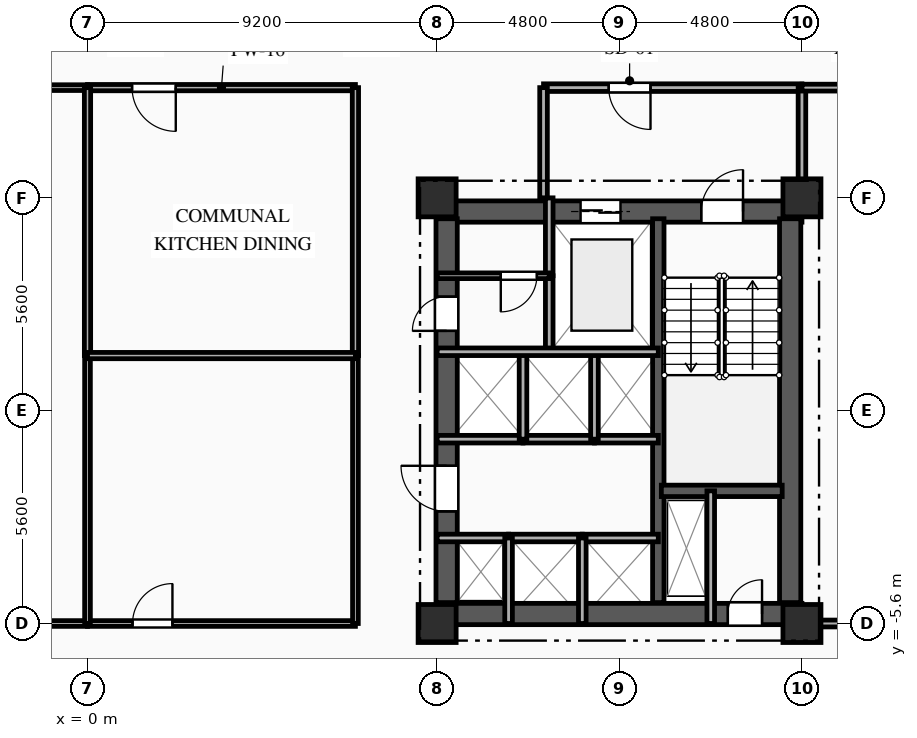
"""IFC4 building model, lengths in metres.
Left out: names, types, materials, properties, quantities, classifications, styles, units other than length and angle.
Written with IfcOpenShell. Run it as: python <this file> out.ifc"""

import sys

from ifc_helpers import new_model, si_unit, direction, frame, frame_2d, origin, origin_2d, place, context, subcontext, project, spatial, rectangle, extrude, element, fill, save


model = new_model("IFC4")
c1 = context("Model", 3, precision=1e-05, world=origin(), true_north=direction((0.0, 1.0)))
c2 = subcontext(c1, "Body", "Model", "MODEL_VIEW")
j1 = project(units=[si_unit("LENGTHUNIT", "METRE"), si_unit("PLANEANGLEUNIT", "RADIAN")], contexts=[c1])
p1 = place(None, origin())
s1 = spatial("IfcSite", under=j1, at=p1, CompositionType="ELEMENT")
p2 = place(p1, origin())
s2 = spatial("IfcBuilding", under=s1, at=p2, CompositionType="ELEMENT")
p3 = place(p2, frame((0.0, 0.0, 89.05)))
s3 = spatial("IfcBuildingStorey", under=s2, at=p3, CompositionType="ELEMENT", Elevation=89.05)
for number, where, z_axis, x_axis in (
    (1, (9.2, -5.6, 0.0), (0.0, 0.0, 1.0), (1.0, 0.0, 0.0)),
    (2, (9.2, 5.6, 0.0), (0.0, 0.0, 1.0), (1.0, 0.0, 0.0)),
    (3, (18.8, -5.6, 0.0), (0.0, 0.0, 1.0), (1.0, 0.0, 0.0)),
    (4, (18.8, 5.6, 0.0), (0.0, 0.0, 1.0), (1.0, 0.0, 0.0)),
):
    element("IfcColumn", number, at=place(p3, frame(where, z_axis=z_axis, x_axis=x_axis)), inside=s3, PredefinedType="COLUMN", context=c2, shape_type="SweptSolid", body=[
        extrude(rectangle(XDim=1.0, YDim=1.0, at=origin_2d()), origin(), (0.0, 0.0, 1.0), 3.35),
    ])
p4 = place(p3, frame((9.2, 5.24, 0.0), z_axis=(0.0, 0.0, 1.0), x_axis=(1.0, 0.0, 0.0)))
e5 = element("IfcWall", 5, at=p4, inside=s3, PredefinedType="SHEAR", context=c2, shape_type="SweptSolid", body=[
    extrude(rectangle(XDim=9.6, YDim=0.56, at=frame_2d((4.8, 0.0))), origin(), (0.0, 0.0, 1.0), 3.045),
])
p5 = place(p4, frame((6.95, 0.0, 0.0)))
e6 = element("IfcOpeningElement", 6, at=p5, cuts=e5, PredefinedType="OPENING", context=c2, shape_type="SweptSolid", body=[
    extrude(rectangle(XDim=1.1, YDim=2.15, at=frame_2d((0.55, 1.075))), frame((0.0, 0.29, 0.0), z_axis=(0.0, -1.0, 0.0), x_axis=(1.0, 0.0, 0.0)), (0.0, 0.0, 1.0), 0.58),
])
p6 = place(p4, frame((3.775, 0.0, 0.0)))
e7 = element("IfcOpeningElement", 7, at=p6, cuts=e5, PredefinedType="OPENING", context=c2, shape_type="SweptSolid", body=[
    extrude(rectangle(XDim=1.05, YDim=2.1, at=frame_2d((0.525, 1.05))), frame((0.0, 0.29, 0.0), z_axis=(0.0, -1.0, 0.0), x_axis=(1.0, 0.0, 0.0)), (0.0, 0.0, 1.0), 0.58),
])
p7 = place(p3, frame((9.2, -5.35, 0.0), z_axis=(0.0, 0.0, 1.0), x_axis=(1.0, 0.0, 0.0)))
e8 = element("IfcWall", 8, at=p7, inside=s3, PredefinedType="SHEAR", context=c2, shape_type="SweptSolid", body=[
    extrude(rectangle(XDim=9.6, YDim=0.56, at=frame_2d((4.8, 0.0))), origin(), (0.0, 0.0, 1.0), 3.045),
])
p8 = place(p7, frame((7.65, 0.0, 0.0)))
e9 = element("IfcOpeningElement", 9, at=p8, cuts=e8, PredefinedType="OPENING", context=c2, shape_type="SweptSolid", body=[
    extrude(rectangle(XDim=0.9, YDim=2.1, at=frame_2d((0.45, 1.05))), frame((0.0, 0.29, 0.0), z_axis=(0.0, -1.0, 0.0), x_axis=(1.0, 0.0, 0.0)), (0.0, 0.0, 1.0), 0.58),
])
p9 = place(p3, frame((9.45, -5.05, 0.0), z_axis=(0.0, 0.0, 1.0), x_axis=(0.0, 1.0, 0.0)))
e10 = element("IfcWall", 10, at=p9, inside=s3, PredefinedType="SHEAR", context=c2, shape_type="SweptSolid", body=[
    extrude(rectangle(XDim=10.1, YDim=0.56, at=frame_2d((5.05, 0.0))), origin(), (0.0, 0.0, 1.0), 3.045),
])
p10 = place(p9, frame((7.15, 0.0, 0.0)))
e11 = element("IfcOpeningElement", 11, at=p10, cuts=e10, PredefinedType="OPENING", context=c2, shape_type="SweptSolid", body=[
    extrude(rectangle(XDim=0.9, YDim=2.1, at=frame_2d((0.45, 1.05))), frame((0.0, 0.29, 0.0), z_axis=(0.0, -1.0, 0.0), x_axis=(1.0, 0.0, 0.0)), (0.0, 0.0, 1.0), 0.58),
])
p11 = place(p9, frame((2.4, 0.0, 0.0)))
e12 = element("IfcOpeningElement", 12, at=p11, cuts=e10, PredefinedType="OPENING", context=c2, shape_type="SweptSolid", body=[
    extrude(rectangle(XDim=1.2, YDim=2.15, at=frame_2d((0.6, 1.075))), frame((0.0, 0.29, 0.0), z_axis=(0.0, -1.0, 0.0), x_axis=(1.0, 0.0, 0.0)), (0.0, 0.0, 1.0), 0.58),
])
p12 = place(p3, frame((18.49, -5.05, 0.0), z_axis=(0.0, 0.0, 1.0), x_axis=(0.0, 1.0, 0.0)))
e13 = element("IfcWall", 13, at=p12, inside=s3, PredefinedType="SHEAR", context=c2, shape_type="SweptSolid", body=[
    extrude(rectangle(XDim=10.1, YDim=0.56, at=frame_2d((5.05, 0.0))), origin(), (0.0, 0.0, 1.0), 3.045),
])
p13 = place(p3, frame((15.02, -5.05, 0.0), z_axis=(0.0, 0.0, 1.0), x_axis=(0.0, 1.0, 0.0)))
e14 = element("IfcWall", 14, at=p13, inside=s3, PredefinedType="SHEAR", context=c2, shape_type="SweptSolid", body=[
    extrude(rectangle(XDim=10.1, YDim=0.3, at=frame_2d((5.05, 0.0))), origin(), (0.0, 0.0, 1.0), 3.045),
])
p14 = place(p3, frame((15.1, -2.11, 0.0), z_axis=(0.0, 0.0, 1.0), x_axis=(1.0, 0.0, 0.0)))
e15 = element("IfcWall", 15, at=p14, inside=s3, PredefinedType="SHEAR", context=c2, shape_type="SweptSolid", body=[
    extrude(rectangle(XDim=3.18, YDim=0.3, at=frame_2d((1.59, 0.0))), origin(), (0.0, 0.0, 1.0), 3.045),
])
p15 = place(p3, frame((16.4, -2.11, 0.0), z_axis=(0.0, 0.0, 1.0), x_axis=(0.0, -1.0, 0.0)))
e16 = element("IfcWall", 16, at=p15, inside=s3, PredefinedType="PARTITIONING", context=c2, shape_type="SweptSolid", body=[
    extrude(rectangle(XDim=3.49, YDim=0.2, at=frame_2d((1.745, 0.0))), origin(), (0.0, 0.0, 1.0), 3.045),
])
p16 = place(p3, frame((12.15, 3.55, 0.0), z_axis=(0.0, 0.0, 1.0), x_axis=(0.0, -1.0, 0.0)))
e17 = element("IfcWall", 17, at=p16, inside=s3, PredefinedType="PARTITIONING", context=c2, shape_type="SweptSolid", body=[
    extrude(rectangle(XDim=2.0, YDim=0.2, at=frame_2d((1.0, 0.0))), origin(), (0.0, 0.0, 1.0), 3.045),
])
p17 = place(p3, frame((12.15, 5.6, 0.0), z_axis=(0.0, 0.0, 1.0), x_axis=(0.0, -1.0, 0.0)))
e18 = element("IfcWall", 18, at=p17, inside=s3, PredefinedType="PARTITIONING", context=c2, shape_type="SweptSolid", body=[
    extrude(rectangle(XDim=2.05, YDim=0.2, at=frame_2d((1.025, 0.0))), origin(), (0.0, 0.0, 1.0), 3.045),
])
p18 = place(p3, frame((18.8, 8.5, 0.0), z_axis=(0.0, 0.0, 1.0), x_axis=(-1.0, 0.0, 0.0)))
e19 = element("IfcWall", 19, at=p18, inside=s3, PredefinedType="PARTITIONING", context=c2, shape_type="SweptSolid", body=[
    extrude(rectangle(XDim=6.8, YDim=0.2, at=frame_2d((3.4, 0.0))), origin(), (0.0, 0.0, 1.0), 3.045),
])
p19 = place(p18, frame((3.985, 0.0, 0.0)))
e20 = element("IfcOpeningElement", 20, at=p19, cuts=e19, PredefinedType="OPENING", context=c2, shape_type="SweptSolid", body=[
    extrude(rectangle(XDim=1.1, YDim=2.15, at=frame_2d((0.55, 1.075))), frame((0.0, 0.11, 0.0), z_axis=(0.0, -1.0, 0.0), x_axis=(1.0, 0.0, 0.0)), (0.0, 0.0, 1.0), 0.22),
])
p20 = place(p3, frame((12.0, 8.5, 0.0), z_axis=(0.0, 0.0, 1.0), x_axis=(0.0, -1.0, 0.0)))
e21 = element("IfcWall", 21, at=p20, inside=s3, PredefinedType="PARTITIONING", context=c2, shape_type="SweptSolid", body=[
    extrude(rectangle(XDim=2.9, YDim=0.2, at=frame_2d((1.45, 0.0))), origin(), (0.0, 0.0, 1.0), 3.045),
])
p21 = place(p3, frame((18.8, 5.6, 0.0), z_axis=(0.0, 0.0, 1.0), x_axis=(0.0, 1.0, 0.0)))
e22 = element("IfcWall", 22, at=p21, inside=s3, PredefinedType="PARTITIONING", context=c2, shape_type="SweptSolid", body=[
    extrude(rectangle(XDim=2.9, YDim=0.2, at=frame_2d((1.45, 0.0))), origin(), (0.0, 0.0, 1.0), 2.53),
])
p22 = place(p3, frame((12.15, 3.55, 0.0), z_axis=(0.0, 0.0, 1.0), x_axis=(-1.0, 0.0, 0.0)))
e23 = element("IfcWall", 23, at=p22, inside=s3, PredefinedType="PARTITIONING", context=c2, shape_type="SweptSolid", body=[
    extrude(rectangle(XDim=2.95, YDim=0.15, at=frame_2d((1.475, 0.0))), origin(), (0.0, 0.0, 1.0), 3.045),
])
p23 = place(p22, frame((0.325, 0.0, 0.0)))
e24 = element("IfcOpeningElement", 24, at=p23, cuts=e23, PredefinedType="OPENING", context=c2, shape_type="SweptSolid", body=[
    extrude(rectangle(XDim=0.95, YDim=2.1, at=frame_2d((0.475, 1.05))), frame((0.0, 0.085, 0.0), z_axis=(0.0, -1.0, 0.0), x_axis=(1.0, 0.0, 0.0)), (0.0, 0.0, 1.0), 0.17),
])
p24 = place(p3, frame((9.2, -3.35, 0.0), z_axis=(0.0, 0.0, 1.0), x_axis=(1.0, 0.0, 0.0)))
e25 = element("IfcWall", 25, at=p24, inside=s3, PredefinedType="PARTITIONING", context=c2, shape_type="SweptSolid", body=[
    extrude(rectangle(XDim=1.88, YDim=0.2, at=frame_2d((0.94, 0.0))), origin(), (0.0, 0.0, 1.0), 2.76),
])
p25 = place(p3, frame((11.08, -3.35, 0.0), z_axis=(0.0, 0.0, 1.0), x_axis=(1.0, 0.0, 0.0)))
e26 = element("IfcWall", 26, at=p25, inside=s3, PredefinedType="PARTITIONING", context=c2, shape_type="SweptSolid", body=[
    extrude(rectangle(XDim=1.94, YDim=0.2, at=frame_2d((0.97, 0.0))), origin(), (0.0, 0.0, 1.0), 3.045),
])
p26 = place(p3, frame((13.02, -3.35, 0.0), z_axis=(0.0, 0.0, 1.0), x_axis=(1.0, 0.0, 0.0)))
e27 = element("IfcWall", 27, at=p26, inside=s3, PredefinedType="PARTITIONING", context=c2, shape_type="SweptSolid", body=[
    extrude(rectangle(XDim=2.0, YDim=0.2, at=frame_2d((1.0, 0.0))), origin(), (0.0, 0.0, 1.0), 3.045),
])
p27 = place(p3, frame((11.46, -0.75, 0.0), z_axis=(0.0, 0.0, 1.0), x_axis=(-1.0, 0.0, 0.0)))
e28 = element("IfcWall", 28, at=p27, inside=s3, PredefinedType="PARTITIONING", context=c2, shape_type="SweptSolid", body=[
    extrude(rectangle(XDim=2.26, YDim=0.2, at=frame_2d((1.13, 0.0))), origin(), (0.0, 0.0, 1.0), 3.045),
])
p28 = place(p3, frame((13.34, -0.75, 0.0), z_axis=(0.0, 0.0, 1.0), x_axis=(-1.0, 0.0, 0.0)))
e29 = element("IfcWall", 29, at=p28, inside=s3, PredefinedType="PARTITIONING", context=c2, shape_type="SweptSolid", body=[
    extrude(rectangle(XDim=1.88, YDim=0.2, at=frame_2d((0.94, 0.0))), origin(), (0.0, 0.0, 1.0), 3.045),
])
p29 = place(p3, frame((15.02, -0.75, 0.0), z_axis=(0.0, 0.0, 1.0), x_axis=(-1.0, 0.0, 0.0)))
e30 = element("IfcWall", 30, at=p29, inside=s3, PredefinedType="PARTITIONING", context=c2, shape_type="SweptSolid", body=[
    extrude(rectangle(XDim=1.68, YDim=0.2, at=frame_2d((0.84, 0.0))), origin(), (0.0, 0.0, 1.0), 3.045),
])
for number, where, z_axis, x_axis in (
    (31, (11.08, -5.6, 0.0), (0.0, 0.0, 1.0), (0.0, 1.0, 0.0)),
    (32, (13.02, -5.6, 0.0), (0.0, 0.0, 1.0), (0.0, 1.0, 0.0)),
):
    element("IfcWall", number, at=place(p3, frame(where, z_axis=z_axis, x_axis=x_axis)), inside=s3, PredefinedType="PARTITIONING", context=c2, shape_type="SweptSolid", body=[
        extrude(rectangle(XDim=2.25, YDim=0.2, at=frame_2d((1.125, 0.0))), origin(), (0.0, 0.0, 1.0), 3.045),
    ])
for number, where, z_axis, x_axis in (
    (33, (11.46, -0.75, 0.0), (0.0, 0.0, 1.0), (0.0, 1.0, 0.0)),
    (34, (13.34, -0.75, 0.0), (0.0, 0.0, 1.0), (0.0, 1.0, 0.0)),
):
    element("IfcWall", number, at=place(p3, frame(where, z_axis=z_axis, x_axis=x_axis)), inside=s3, PredefinedType="PARTITIONING", context=c2, shape_type="SweptSolid", body=[
        extrude(rectangle(XDim=2.3, YDim=0.2, at=frame_2d((1.15, 0.0))), origin(), (0.0, 0.0, 1.0), 3.045),
    ])
p30 = place(p3, frame((0.0, 8.5, 0.0), z_axis=(0.0, 0.0, 1.0), x_axis=(-1.0, 0.0, 0.0)))
e35 = element("IfcWall", 35, at=p30, inside=s3, PredefinedType="PARTITIONING", context=c2, shape_type="SweptSolid", body=[
    extrude(rectangle(XDim=7.05, YDim=0.15, at=frame_2d((3.525, 0.0))), origin(), (0.0, 0.0, 1.0), 3.045),
])
p31 = place(p3, frame((21.45, 8.5, 0.0), z_axis=(0.0, 0.0, 1.0), x_axis=(-1.0, 0.0, 0.0)))
e36 = element("IfcWall", 36, at=p31, inside=s3, PredefinedType="PARTITIONING", context=c2, shape_type="SweptSolid", body=[
    extrude(rectangle(XDim=2.65, YDim=0.18, at=frame_2d((1.325, 0.0))), origin(), (0.0, 0.0, 1.0), 3.045),
])
p32 = place(p31, frame((0.641, 0.0, 0.0)))
e37 = element("IfcOpeningElement", 37, at=p32, cuts=e36, PredefinedType="OPENING", context=c2, shape_type="SweptSolid", body=[
    extrude(rectangle(XDim=1.0, YDim=2.15, at=frame_2d((0.5, 1.075))), frame((0.0, 0.1, 0.0), z_axis=(0.0, -1.0, 0.0), x_axis=(1.0, 0.0, 0.0)), (0.0, 0.0, 1.0), 0.2),
])
p33 = place(p3, frame((7.05, 8.5, 0.0), z_axis=(0.0, 0.0, 1.0), x_axis=(-1.0, 0.0, 0.0)))
e38 = element("IfcWall", 38, at=p33, inside=s3, PredefinedType="PARTITIONING", context=c2, shape_type="SweptSolid", body=[
    extrude(rectangle(XDim=7.05, YDim=0.165, at=frame_2d((3.525, 0.0))), origin(), (0.0, 0.0, 1.0), 3.045),
])
p34 = place(p33, frame((4.728, 0.0, 0.0)))
e39 = element("IfcOpeningElement", 39, at=p34, cuts=e38, PredefinedType="OPENING", context=c2, shape_type="SweptSolid", body=[
    extrude(rectangle(XDim=1.15, YDim=2.15, at=frame_2d((0.575, 1.075))), frame((0.0, 0.093, 0.0), z_axis=(0.0, -1.0, 0.0), x_axis=(1.0, 0.0, 0.0)), (0.0, 0.0, 1.0), 0.185),
])
p35 = place(p3, frame((-7.05, -5.6, 0.0), z_axis=(0.0, 0.0, 1.0), x_axis=(1.0, 0.0, 0.0)))
e40 = element("IfcWall", 40, at=p35, inside=s3, PredefinedType="PARTITIONING", context=c2, shape_type="SweptSolid", body=[
    extrude(rectangle(XDim=7.05, YDim=0.15, at=frame_2d((3.525, 0.0))), origin(), (0.0, 0.0, 1.0), 2.53),
])
p36 = place(p3, frame((18.8, -5.6, 0.0), z_axis=(0.0, 0.0, 1.0), x_axis=(1.0, 0.0, 0.0)))
e41 = element("IfcWall", 41, at=p36, inside=s3, PredefinedType="PARTITIONING", context=c2, shape_type="SweptSolid", body=[
    extrude(rectangle(XDim=2.65, YDim=0.18, at=frame_2d((1.325, 0.0))), origin(), (0.0, 0.0, 1.0), 2.53),
])
p37 = place(p3, frame((0.0, -5.6, 0.0), z_axis=(0.0, 0.0, 1.0), x_axis=(1.0, 0.0, 0.0)))
e42 = element("IfcWall", 42, at=p37, inside=s3, PredefinedType="PARTITIONING", context=c2, shape_type="SweptSolid", body=[
    extrude(rectangle(XDim=7.05, YDim=0.15, at=frame_2d((3.525, 0.0))), origin(), (0.0, 0.0, 1.0), 2.53),
])
p38 = place(p37, frame((1.185, 0.0, 0.0)))
e43 = element("IfcOpeningElement", 43, at=p38, cuts=e42, PredefinedType="OPENING", context=c2, shape_type="SweptSolid", body=[
    extrude(rectangle(XDim=1.05, YDim=2.15, at=frame_2d((0.525, 1.075))), frame((0.0, 0.085, 0.0), z_axis=(0.0, -1.0, 0.0), x_axis=(1.0, 0.0, 0.0)), (0.0, 0.0, 1.0), 0.17),
])
p39 = place(p3, frame((7.05, -5.6, 0.0), z_axis=(0.0, 0.0, 1.0), x_axis=(0.0, 1.0, 0.0)))
e44 = element("IfcWall", 44, at=p39, inside=s3, PredefinedType="PARTITIONING", context=c2, shape_type="SweptSolid", body=[
    extrude(rectangle(XDim=7.05, YDim=0.15, at=frame_2d((3.525, 0.0))), origin(), (0.0, 0.0, 1.0), 3.045),
])
p40 = place(p3, frame((7.05, 1.45, 0.0), z_axis=(0.0, 0.0, 1.0), x_axis=(0.0, 1.0, 0.0)))
e45 = element("IfcWall", 45, at=p40, inside=s3, PredefinedType="PARTITIONING", context=c2, shape_type="SweptSolid", body=[
    extrude(rectangle(XDim=7.05, YDim=0.165, at=frame_2d((3.525, 0.0))), origin(), (0.0, 0.0, 1.0), 3.045),
])
p41 = place(p3, frame((0.0, 1.45, 0.0), z_axis=(0.0, 0.0, 1.0), x_axis=(0.0, -1.0, 0.0)))
e46 = element("IfcWall", 46, at=p41, inside=s3, PredefinedType="PARTITIONING", context=c2, shape_type="SweptSolid", body=[
    extrude(rectangle(XDim=7.05, YDim=0.15, at=frame_2d((3.525, 0.0))), origin(), (0.0, 0.0, 1.0), 3.045),
])
for number, where, z_axis, x_axis in (
    (47, (0.0, 8.5, 0.0), (0.0, 0.0, 1.0), (0.0, -1.0, 0.0)),
    (48, (0.0, 1.45, 0.0), (0.0, 0.0, 1.0), (1.0, 0.0, 0.0)),
):
    element("IfcWall", number, at=place(p3, frame(where, z_axis=z_axis, x_axis=x_axis)), inside=s3, PredefinedType="PARTITIONING", context=c2, shape_type="SweptSolid", body=[
        extrude(rectangle(XDim=7.05, YDim=0.165, at=frame_2d((3.525, 0.0))), origin(), (0.0, 0.0, 1.0), 3.045),
    ])
p42 = place(p3, frame((9.2, 1.55, 0.0), z_axis=(0.0, 0.0, 1.0), x_axis=(1.0, 0.0, 0.0)))
e49 = element("IfcWall", 49, at=p42, inside=s3, PredefinedType="PARTITIONING", context=c2, shape_type="SweptSolid", body=[
    extrude(rectangle(XDim=5.82, YDim=0.2, at=frame_2d((2.91, 0.0))), origin(), (0.0, 0.0, 1.0), 3.045),
])
p43 = place(p5, origin())
e50 = element("IfcDoor", 50, at=p43, inside=s3, OperationType="SINGLE_SWING_RIGHT", PredefinedType="DOOR", context=c2, shape_type="SweptSolid", body=[
    extrude(rectangle(XDim=1.1, YDim=2.15, at=frame_2d((0.55, 1.075))), frame((0.0, 0.025, 0.0), z_axis=(0.0, -1.0, 0.0), x_axis=(1.0, 0.0, 0.0)), (0.0, 0.0, 1.0), 0.05),
])
fill(e6, e50)
p44 = place(p6, origin())
e51 = element("IfcDoor", 51, at=p44, inside=s3, OperationType="DOUBLE_DOOR_SLIDING", PredefinedType="DOOR", context=c2, shape_type="SweptSolid", body=[
    extrude(rectangle(XDim=1.05, YDim=2.1, at=frame_2d((0.525, 1.05))), frame((0.0, 0.025, 0.0), z_axis=(0.0, -1.0, 0.0), x_axis=(1.0, 0.0, 0.0)), (0.0, 0.0, 1.0), 0.05),
])
fill(e7, e51)
p45 = place(p8, origin())
e52 = element("IfcDoor", 52, at=p45, inside=s3, OperationType="SINGLE_SWING_RIGHT", PredefinedType="DOOR", context=c2, shape_type="SweptSolid", body=[
    extrude(rectangle(XDim=0.9, YDim=2.1, at=frame_2d((0.45, 1.05))), frame((0.0, 0.025, 0.0), z_axis=(0.0, -1.0, 0.0), x_axis=(1.0, 0.0, 0.0)), (0.0, 0.0, 1.0), 0.05),
])
fill(e9, e52)
p46 = place(p19, origin())
e53 = element("IfcDoor", 53, at=p46, inside=s3, OperationType="SINGLE_SWING_LEFT", PredefinedType="DOOR", context=c2, shape_type="SweptSolid", body=[
    extrude(rectangle(XDim=1.1, YDim=2.15, at=frame_2d((0.55, 1.075))), frame((0.0, 0.025, 0.0), z_axis=(0.0, -1.0, 0.0), x_axis=(1.0, 0.0, 0.0)), (0.0, 0.0, 1.0), 0.05),
])
fill(e20, e53)
p47 = place(p23, origin())
e54 = element("IfcDoor", 54, at=p47, inside=s3, OperationType="SINGLE_SWING_RIGHT", PredefinedType="DOOR", context=c2, shape_type="SweptSolid", body=[
    extrude(rectangle(XDim=0.95, YDim=2.1, at=frame_2d((0.475, 1.05))), frame((0.0, 0.025, 0.0), z_axis=(0.0, -1.0, 0.0), x_axis=(1.0, 0.0, 0.0)), (0.0, 0.0, 1.0), 0.05),
])
fill(e24, e54)
p48 = place(p10, origin())
e55 = element("IfcDoor", 55, at=p48, inside=s3, OperationType="SINGLE_SWING_LEFT", PredefinedType="DOOR", context=c2, shape_type="SweptSolid", body=[
    extrude(rectangle(XDim=0.9, YDim=2.1, at=frame_2d((0.45, 1.05))), frame((0.0, 0.025, 0.0), z_axis=(0.0, -1.0, 0.0), x_axis=(1.0, 0.0, 0.0)), (0.0, 0.0, 1.0), 0.05),
])
fill(e11, e55)
p49 = place(p11, origin())
e56 = element("IfcDoor", 56, at=p49, inside=s3, OperationType="SINGLE_SWING_RIGHT", PredefinedType="DOOR", context=c2, shape_type="SweptSolid", body=[
    extrude(rectangle(XDim=1.2, YDim=2.15, at=frame_2d((0.6, 1.075))), frame((0.0, 0.025, 0.0), z_axis=(0.0, -1.0, 0.0), x_axis=(1.0, 0.0, 0.0)), (0.0, 0.0, 1.0), 0.05),
])
fill(e12, e56)
p50 = place(p34, origin())
e57 = element("IfcDoor", 57, at=p50, inside=s3, OperationType="SINGLE_SWING_LEFT", PredefinedType="DOOR", context=c2, shape_type="SweptSolid", body=[
    extrude(rectangle(XDim=1.15, YDim=2.15, at=frame_2d((0.575, 1.075))), frame((0.0, 0.025, 0.0), z_axis=(0.0, -1.0, 0.0), x_axis=(1.0, 0.0, 0.0)), (0.0, 0.0, 1.0), 0.05),
])
fill(e39, e57)
p51 = place(p38, origin())
e58 = element("IfcDoor", 58, at=p51, inside=s3, OperationType="SINGLE_SWING_RIGHT", PredefinedType="DOOR", context=c2, shape_type="SweptSolid", body=[
    extrude(rectangle(XDim=1.05, YDim=2.15, at=frame_2d((0.525, 1.075))), frame((0.0, 0.025, 0.0), z_axis=(0.0, -1.0, 0.0), x_axis=(1.0, 0.0, 0.0)), (0.0, 0.0, 1.0), 0.05),
])
fill(e43, e58)
save(model, sys.argv[1])
